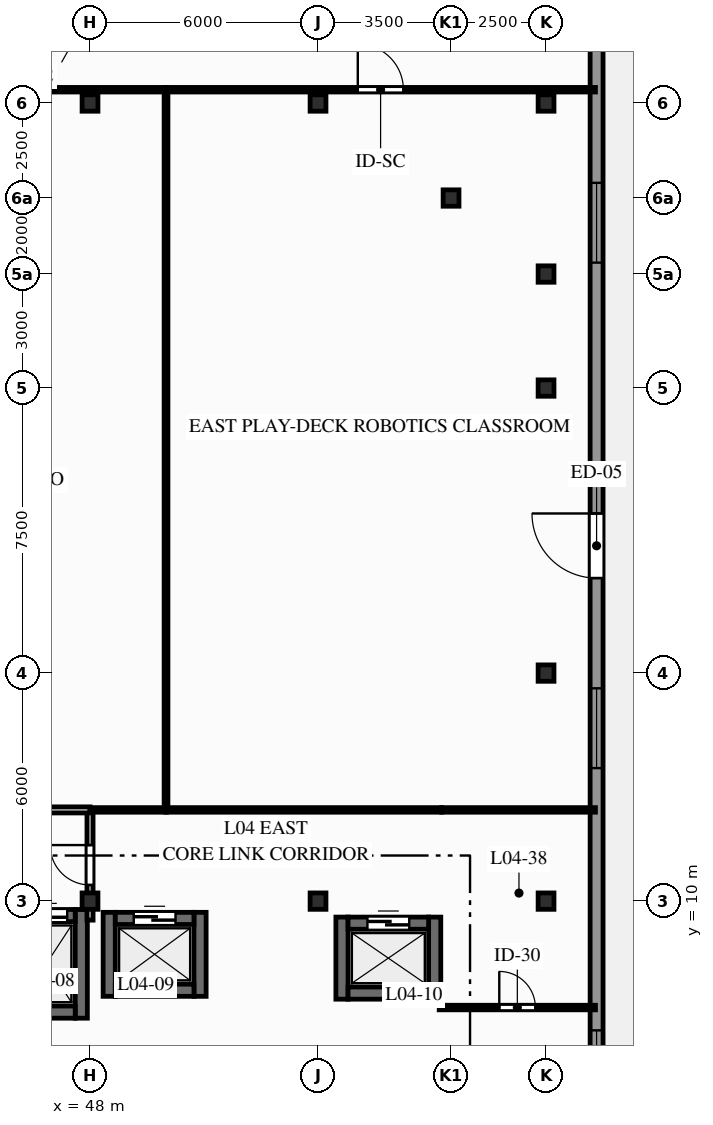
"""IFC4 building model, lengths in metres.
Left out: names, types, materials, properties, quantities, classifications, styles, units other than length and angle.
Written with IfcOpenShell. Run it as: python <this file> out.ifc"""

import sys

from ifc_helpers import new_model, si_unit, direction, frame, frame_2d, origin, origin_2d, place, context, subcontext, project, spatial, rectangle, i_section, extrude, element, fill, save


model = new_model("IFC4")
c1 = context("Model", 3, precision=1e-05, world=origin(), true_north=direction((0.0, 1.0)))
c2 = subcontext(c1, "Body", "Model", "MODEL_VIEW")
j1 = project(units=[si_unit("LENGTHUNIT", "METRE"), si_unit("PLANEANGLEUNIT", "RADIAN")], contexts=[c1])
p1 = place(None, origin())
s1 = spatial("IfcSite", under=j1, at=p1, CompositionType="ELEMENT")
p2 = place(p1, origin())
s2 = spatial("IfcBuilding", under=s1, at=p2, CompositionType="ELEMENT")
p3 = place(p2, frame((0.0, 0.0, 18.0)))
s3 = spatial("IfcBuildingStorey", under=s2, at=p3, CompositionType="ELEMENT", Elevation=18.0)
for number, where, z_axis, x_axis in (
    (1, (48.0, 10.0, 0.0), (0.0, 0.0, 1.0), (1.0, 0.0, 0.0)),
    (2, (48.0, 31.0, 0.0), (0.0, 0.0, 1.0), (1.0, 0.0, 0.0)),
    (3, (54.0, 10.0, 0.0), (0.0, 0.0, 1.0), (1.0, 0.0, 0.0)),
    (4, (54.0, 31.0, 0.0), (0.0, 0.0, 1.0), (1.0, 0.0, 0.0)),
    (5, (57.5, 28.5, 0.0), (0.0, 0.0, 1.0), (1.0, 0.0, 0.0)),
    (6, (60.0, 10.0, 0.0), (0.0, 0.0, 1.0), (1.0, 0.0, 0.0)),
    (7, (60.0, 16.0, 0.0), (0.0, 0.0, 1.0), (1.0, 0.0, 0.0)),
    (8, (60.0, 23.5, 0.0), (0.0, 0.0, 1.0), (1.0, 0.0, 0.0)),
    (9, (60.0, 26.5, 0.0), (0.0, 0.0, 1.0), (1.0, 0.0, 0.0)),
    (10, (60.0, 31.0, 0.0), (0.0, 0.0, 1.0), (1.0, 0.0, 0.0)),
):
    element("IfcColumn", number, at=place(p3, frame(where, z_axis=z_axis, x_axis=x_axis)), inside=s3, PredefinedType="COLUMN", context=c2, shape_type="SweptSolid", body=[
        extrude(i_section(OverallWidth=0.417, OverallDepth=0.431, WebThickness=0.065, FlangeThickness=0.106, FilletRadius=0.015, at=origin_2d()), origin(), (0.0, 0.0, 1.0), 4.5),
    ])
p4 = place(p3, frame((61.33, -1.83, 0.0), z_axis=(0.0, 0.0, 1.0), x_axis=(0.0, 1.0, 0.0)))
e11 = element("IfcWall", 11, at=p4, inside=s3, PredefinedType="STANDARD", context=c2, shape_type="SweptSolid", body=[
    extrude(rectangle(XDim=36.43, YDim=0.34, at=frame_2d((18.215, 0.0))), origin(), (0.0, 0.0, 1.0), 4.22),
])
p5 = place(p4, frame((6.33, 0.0, 0.9)))
e12 = element("IfcOpeningElement", 12, at=p5, cuts=e11, PredefinedType="OPENING", context=c2, shape_type="SweptSolid", body=[
    extrude(rectangle(XDim=2.1, YDim=2.05, at=frame_2d((1.05, 1.025))), frame((0.0, 0.18, 0.0), z_axis=(0.0, -1.0, 0.0), x_axis=(1.0, 0.0, 0.0)), (0.0, 0.0, 1.0), 0.36),
])
p6 = place(p4, frame((15.33, 0.0, 0.9)))
e13 = element("IfcOpeningElement", 13, at=p6, cuts=e11, PredefinedType="OPENING", context=c2, shape_type="SweptSolid", body=[
    extrude(rectangle(XDim=2.1, YDim=2.05, at=frame_2d((1.05, 1.025))), frame((0.0, 0.18, 0.0), z_axis=(0.0, -1.0, 0.0), x_axis=(1.0, 0.0, 0.0)), (0.0, 0.0, 1.0), 0.36),
])
p7 = place(p4, frame((28.63, 0.0, 0.9)))
e14 = element("IfcOpeningElement", 14, at=p7, cuts=e11, PredefinedType="OPENING", context=c2, shape_type="SweptSolid", body=[
    extrude(rectangle(XDim=2.1, YDim=2.05, at=frame_2d((1.05, 1.025))), frame((0.0, 0.18, 0.0), z_axis=(0.0, -1.0, 0.0), x_axis=(1.0, 0.0, 0.0)), (0.0, 0.0, 1.0), 0.36),
])
p8 = place(p4, frame((20.33, 0.0, 0.0)))
e15 = element("IfcOpeningElement", 15, at=p8, cuts=e11, PredefinedType="OPENING", context=c2, shape_type="SweptSolid", body=[
    extrude(rectangle(XDim=1.7, YDim=2.3, at=frame_2d((0.85, 1.15))), frame((0.0, 0.18, 0.0), z_axis=(0.0, -1.0, 0.0), x_axis=(1.0, 0.0, 0.0)), (0.0, 0.0, 1.0), 0.36),
])
p9 = place(p3, frame((47.77, 6.92, 0.0), z_axis=(0.0, 0.0, 1.0), x_axis=(0.0, 1.0, 0.0)))
e16 = element("IfcWall", 16, at=p9, inside=s3, PredefinedType="SHEAR", context=c2, shape_type="SweptSolid", body=[
    extrude(rectangle(XDim=2.86, YDim=0.32, at=frame_2d((1.43, 0.0))), origin(), (0.0, 0.0, 1.0), 4.22),
])
p10 = place(p3, frame((46.09, 7.08, 0.0), z_axis=(0.0, 0.0, 1.0), x_axis=(1.0, 0.0, 0.0)))
e17 = element("IfcWall", 17, at=p10, inside=s3, PredefinedType="SHEAR", context=c2, shape_type="SweptSolid", body=[
    extrude(rectangle(XDim=1.52, YDim=0.32, at=frame_2d((0.76, 0.0))), origin(), (0.0, 0.0, 1.0), 4.22),
])
p11 = place(p3, frame((46.09, 9.62, 0.0), z_axis=(0.0, 0.0, 1.0), x_axis=(1.0, 0.0, 0.0)))
e18 = element("IfcWall", 18, at=p11, inside=s3, PredefinedType="SHEAR", context=c2, shape_type="SweptSolid", body=[
    extrude(rectangle(XDim=1.52, YDim=0.32, at=frame_2d((0.76, 0.0))), origin(), (0.0, 0.0, 1.0), 4.22),
])
p12 = place(p11, frame((0.21, 0.0, 0.0)))
e19 = element("IfcOpeningElement", 19, at=p12, cuts=e18, PredefinedType="OPENING", context=c2, shape_type="SweptSolid", body=[
    extrude(rectangle(XDim=1.1, YDim=2.06, at=frame_2d((0.55, 1.03))), frame((0.0, 0.17, 0.0), z_axis=(0.0, -1.0, 0.0), x_axis=(1.0, 0.0, 0.0)), (0.0, 0.0, 1.0), 0.34),
])
for number, where, z_axis, x_axis in (
    (20, (48.505, 7.495, 0.0), (0.0, 0.0, 1.0), (0.0, 1.0, 0.0)),
    (21, (50.895, 7.495, 0.0), (0.0, 0.0, 1.0), (0.0, 1.0, 0.0)),
):
    element("IfcWall", number, at=place(p3, frame(where, z_axis=z_axis, x_axis=x_axis)), inside=s3, PredefinedType="SHEAR", context=c2, shape_type="SweptSolid", body=[
        extrude(rectangle(XDim=2.21, YDim=0.32, at=frame_2d((1.105, 0.0))), origin(), (0.0, 0.0, 1.0), 4.22),
    ])
p13 = place(p3, frame((48.665, 7.655, 0.0), z_axis=(0.0, 0.0, 1.0), x_axis=(1.0, 0.0, 0.0)))
e22 = element("IfcWall", 22, at=p13, inside=s3, PredefinedType="SHEAR", context=c2, shape_type="SweptSolid", body=[
    extrude(rectangle(XDim=2.07, YDim=0.32, at=frame_2d((1.035, 0.0))), origin(), (0.0, 0.0, 1.0), 4.22),
])
p14 = place(p3, frame((48.665, 9.545, 0.0), z_axis=(0.0, 0.0, 1.0), x_axis=(1.0, 0.0, 0.0)))
e23 = element("IfcWall", 23, at=p14, inside=s3, PredefinedType="SHEAR", context=c2, shape_type="SweptSolid", body=[
    extrude(rectangle(XDim=2.07, YDim=0.32, at=frame_2d((1.035, 0.0))), origin(), (0.0, 0.0, 1.0), 4.22),
])
p15 = place(p14, frame((0.485, 0.0, 0.0)))
e24 = element("IfcOpeningElement", 24, at=p15, cuts=e23, PredefinedType="OPENING", context=c2, shape_type="SweptSolid", body=[
    extrude(rectangle(XDim=1.1, YDim=2.06, at=frame_2d((0.55, 1.03))), frame((0.0, 0.17, 0.0), z_axis=(0.0, -1.0, 0.0), x_axis=(1.0, 0.0, 0.0)), (0.0, 0.0, 1.0), 0.34),
])
for number, where, z_axis, x_axis in (
    (25, (54.63, 7.42, 0.0), (0.0, 0.0, 1.0), (0.0, 1.0, 0.0)),
    (26, (57.07, 7.42, 0.0), (0.0, 0.0, 1.0), (0.0, 1.0, 0.0)),
):
    element("IfcWall", number, at=place(p3, frame(where, z_axis=z_axis, x_axis=x_axis)), inside=s3, PredefinedType="SHEAR", context=c2, shape_type="SweptSolid", body=[
        extrude(rectangle(XDim=2.16, YDim=0.32, at=frame_2d((1.08, 0.0))), origin(), (0.0, 0.0, 1.0), 4.22),
    ])
p16 = place(p3, frame((54.79, 7.58, 0.0), z_axis=(0.0, 0.0, 1.0), x_axis=(1.0, 0.0, 0.0)))
e27 = element("IfcWall", 27, at=p16, inside=s3, PredefinedType="SHEAR", context=c2, shape_type="SweptSolid", body=[
    extrude(rectangle(XDim=2.12, YDim=0.32, at=frame_2d((1.06, 0.0))), origin(), (0.0, 0.0, 1.0), 4.22),
])
p17 = place(p3, frame((54.79, 9.42, 0.0), z_axis=(0.0, 0.0, 1.0), x_axis=(1.0, 0.0, 0.0)))
e28 = element("IfcWall", 28, at=p17, inside=s3, PredefinedType="SHEAR", context=c2, shape_type="SweptSolid", body=[
    extrude(rectangle(XDim=2.12, YDim=0.32, at=frame_2d((1.06, 0.0))), origin(), (0.0, 0.0, 1.0), 4.22),
])
p18 = place(p17, frame((0.51, 0.0, 0.0)))
e29 = element("IfcOpeningElement", 29, at=p18, cuts=e28, PredefinedType="OPENING", context=c2, shape_type="SweptSolid", body=[
    extrude(rectangle(XDim=1.1, YDim=2.06, at=frame_2d((0.55, 1.03))), frame((0.0, 0.17, 0.0), z_axis=(0.0, -1.0, 0.0), x_axis=(1.0, 0.0, 0.0)), (0.0, 0.0, 1.0), 0.34),
])
p19 = place(p3, frame((48.0, 9.5, 0.0), z_axis=(0.0, 0.0, 1.0), x_axis=(0.0, 1.0, 0.0)))
e30 = element("IfcWall", 30, at=p19, inside=s3, PredefinedType="PARTITIONING", context=c2, shape_type="SweptSolid", body=[
    extrude(rectangle(XDim=2.9, YDim=0.16, at=frame_2d((1.45, 0.0))), origin(), (0.0, 0.0, 1.0), 3.344),
])
p20 = place(p19, frame((0.925, 0.0, 0.0)))
e31 = element("IfcOpeningElement", 31, at=p20, cuts=e30, PredefinedType="OPENING", context=c2, shape_type="SweptSolid", body=[
    extrude(rectangle(XDim=1.05, YDim=2.06, at=frame_2d((0.525, 1.03))), frame((0.0, 0.09, 0.0), z_axis=(0.0, -1.0, 0.0), x_axis=(1.0, 0.0, 0.0)), (0.0, 0.0, 1.0), 0.18),
])
p21 = place(p3, frame((42.2, 12.4, 0.0), z_axis=(0.0, 0.0, 1.0), x_axis=(1.0, 0.0, 0.0)))
e32 = element("IfcWall", 32, at=p21, inside=s3, PredefinedType="PARTITIONING", context=c2, shape_type="SweptSolid", body=[
    extrude(rectangle(XDim=5.8, YDim=0.16, at=frame_2d((2.9, 0.0))), origin(), (0.0, 0.0, 1.0), 3.344),
])
p22 = place(p3, frame((38.493, 31.35, 0.0), z_axis=(0.0, 0.0, 1.0), x_axis=(1.0, 0.0, 0.0)))
e33 = element("IfcWall", 33, at=p22, inside=s3, PredefinedType="PARTITIONING", context=c2, shape_type="SweptSolid", body=[
    extrude(rectangle(XDim=11.519, YDim=0.12, at=frame_2d((5.759, 0.0))), origin(), (0.0, 0.0, 1.0), 3.344),
])
p23 = place(p22, frame((5.159, 0.0, 0.0)))
e34 = element("IfcOpeningElement", 34, at=p23, cuts=e33, PredefinedType="OPENING", context=c2, shape_type="SweptSolid", body=[
    extrude(rectangle(XDim=1.2, YDim=2.08, at=frame_2d((0.6, 1.04))), frame((0.0, 0.07, 0.0), z_axis=(0.0, -1.0, 0.0), x_axis=(1.0, 0.0, 0.0)), (0.0, 0.0, 1.0), 0.14),
])
p24 = place(p3, frame((49.993, 31.35, 0.0), z_axis=(0.0, 0.0, 1.0), x_axis=(1.0, 0.0, 0.0)))
e35 = element("IfcWall", 35, at=p24, inside=s3, PredefinedType="PARTITIONING", context=c2, shape_type="SweptSolid", body=[
    extrude(rectangle(XDim=11.307, YDim=0.12, at=frame_2d((5.654, 0.0))), origin(), (0.0, 0.0, 1.0), 4.22),
])
p25 = place(p24, frame((5.054, 0.0, 0.0)))
e36 = element("IfcOpeningElement", 36, at=p25, cuts=e35, PredefinedType="OPENING", context=c2, shape_type="SweptSolid", body=[
    extrude(rectangle(XDim=1.2, YDim=2.08, at=frame_2d((0.6, 1.04))), frame((0.0, 0.07, 0.0), z_axis=(0.0, -1.0, 0.0), x_axis=(1.0, 0.0, 0.0)), (0.0, 0.0, 1.0), 0.14),
])
p26 = place(p3, frame((48.004, 12.4, 0.0), z_axis=(0.0, 0.0, 1.0), x_axis=(1.0, 0.0, 0.0)))
e37 = element("IfcWall", 37, at=p26, inside=s3, PredefinedType="PARTITIONING", context=c2, shape_type="SweptSolid", body=[
    extrude(rectangle(XDim=2.007, YDim=0.12, at=frame_2d((1.004, 0.0))), origin(), (0.0, 0.0, 1.0), 3.344),
])
p27 = place(p3, frame((49.993, 12.4, 0.0), z_axis=(0.0, 0.0, 1.0), x_axis=(1.0, 0.0, 0.0)))
e38 = element("IfcWall", 38, at=p27, inside=s3, PredefinedType="PARTITIONING", context=c2, shape_type="SweptSolid", body=[
    extrude(rectangle(XDim=7.257, YDim=0.12, at=frame_2d((3.629, 0.0))), origin(), (0.0, 0.0, 1.0), 3.344),
])
p28 = place(p3, frame((50.0, 12.404, 0.0), z_axis=(0.0, 0.0, 1.0), x_axis=(0.0, 1.0, 0.0)))
e39 = element("IfcWall", 39, at=p28, inside=s3, PredefinedType="PARTITIONING", context=c2, shape_type="SweptSolid", body=[
    extrude(rectangle(XDim=18.942, YDim=0.1, at=frame_2d((9.471, 0.0))), origin(), (0.0, 0.0, 1.0), 3.583),
])
p29 = place(p3, frame((57.254, 12.4, 0.0), z_axis=(0.0, 0.0, 1.0), x_axis=(1.0, 0.0, 0.0)))
e40 = element("IfcWall", 40, at=p29, inside=s3, PredefinedType="PARTITIONING", context=c2, shape_type="SweptSolid", body=[
    extrude(rectangle(XDim=4.046, YDim=0.12, at=frame_2d((2.023, 0.0))), origin(), (0.0, 0.0, 1.0), 3.583),
])
p30 = place(p3, frame((57.189, 7.2, 0.0), z_axis=(0.0, 0.0, 1.0), x_axis=(1.0, 0.0, 0.0)))
e41 = element("IfcWall", 41, at=p30, inside=s3, PredefinedType="PARTITIONING", context=c2, shape_type="SweptSolid", body=[
    extrude(rectangle(XDim=4.111, YDim=0.12, at=frame_2d((2.056, 0.0))), origin(), (0.0, 0.0, 1.0), 4.22),
])
p31 = place(p30, frame((1.581, 0.0, 0.0)))
e42 = element("IfcOpeningElement", 42, at=p31, cuts=e41, PredefinedType="OPENING", context=c2, shape_type="SweptSolid", body=[
    extrude(rectangle(XDim=0.95, YDim=2.05, at=frame_2d((0.475, 1.025))), frame((0.0, 0.07, 0.0), z_axis=(0.0, -1.0, 0.0), x_axis=(1.0, 0.0, 0.0)), (0.0, 0.0, 1.0), 0.14),
])
p32 = place(p5, origin())
e43 = element("IfcWindow", 43, at=p32, inside=s3, PartitioningType="SINGLE_PANEL", PredefinedType="WINDOW", context=c2, shape_type="SweptSolid", body=[
    extrude(rectangle(XDim=2.1, YDim=2.05, at=frame_2d((1.05, 1.025))), frame((0.0, 0.03, 0.0), z_axis=(0.0, -1.0, 0.0), x_axis=(1.0, 0.0, 0.0)), (0.0, 0.0, 1.0), 0.06),
])
fill(e12, e43)
p33 = place(p6, origin())
e44 = element("IfcWindow", 44, at=p33, inside=s3, PartitioningType="SINGLE_PANEL", PredefinedType="WINDOW", context=c2, shape_type="SweptSolid", body=[
    extrude(rectangle(XDim=2.1, YDim=2.05, at=frame_2d((1.05, 1.025))), frame((0.0, 0.03, 0.0), z_axis=(0.0, -1.0, 0.0), x_axis=(1.0, 0.0, 0.0)), (0.0, 0.0, 1.0), 0.06),
])
fill(e13, e44)
p34 = place(p7, origin())
e45 = element("IfcWindow", 45, at=p34, inside=s3, PartitioningType="SINGLE_PANEL", PredefinedType="WINDOW", context=c2, shape_type="SweptSolid", body=[
    extrude(rectangle(XDim=2.1, YDim=2.05, at=frame_2d((1.05, 1.025))), frame((0.0, 0.03, 0.0), z_axis=(0.0, -1.0, 0.0), x_axis=(1.0, 0.0, 0.0)), (0.0, 0.0, 1.0), 0.06),
])
fill(e14, e45)
p35 = place(p8, origin())
e46 = element("IfcDoor", 46, at=p35, inside=s3, OperationType="SINGLE_SWING_RIGHT", PredefinedType="DOOR", context=c2, shape_type="SweptSolid", body=[
    extrude(rectangle(XDim=1.7, YDim=2.3, at=frame_2d((0.85, 1.15))), frame((0.0, 0.025, 0.0), z_axis=(0.0, -1.0, 0.0), x_axis=(1.0, 0.0, 0.0)), (0.0, 0.0, 1.0), 0.05),
])
fill(e15, e46)
p36 = place(p12, origin())
e47 = element("IfcDoor", 47, at=p36, inside=s3, OperationType="SLIDING_TO_LEFT", PredefinedType="DOOR", context=c2, shape_type="SweptSolid", body=[
    extrude(rectangle(XDim=1.1, YDim=2.06, at=frame_2d((0.55, 1.03))), frame((0.0, 0.025, 0.0), z_axis=(0.0, -1.0, 0.0), x_axis=(1.0, 0.0, 0.0)), (0.0, 0.0, 1.0), 0.05),
])
fill(e19, e47)
p37 = place(p15, origin())
e48 = element("IfcDoor", 48, at=p37, inside=s3, OperationType="SLIDING_TO_RIGHT", PredefinedType="DOOR", context=c2, shape_type="SweptSolid", body=[
    extrude(rectangle(XDim=1.1, YDim=2.06, at=frame_2d((0.55, 1.03))), frame((0.0, 0.025, 0.0), z_axis=(0.0, -1.0, 0.0), x_axis=(1.0, 0.0, 0.0)), (0.0, 0.0, 1.0), 0.05),
])
fill(e24, e48)
p38 = place(p18, origin())
e49 = element("IfcDoor", 49, at=p38, inside=s3, OperationType="SLIDING_TO_LEFT", PredefinedType="DOOR", context=c2, shape_type="SweptSolid", body=[
    extrude(rectangle(XDim=1.1, YDim=2.06, at=frame_2d((0.55, 1.03))), frame((0.0, 0.025, 0.0), z_axis=(0.0, -1.0, 0.0), x_axis=(1.0, 0.0, 0.0)), (0.0, 0.0, 1.0), 0.05),
])
fill(e29, e49)
p39 = place(p20, origin())
e50 = element("IfcDoor", 50, at=p39, inside=s3, OperationType="SINGLE_SWING_RIGHT", PredefinedType="DOOR", context=c2, shape_type="SweptSolid", body=[
    extrude(rectangle(XDim=1.05, YDim=2.06, at=frame_2d((0.525, 1.03))), frame((0.0, 0.025, 0.0), z_axis=(0.0, -1.0, 0.0), x_axis=(1.0, 0.0, 0.0)), (0.0, 0.0, 1.0), 0.05),
])
fill(e31, e50)
p40 = place(p25, origin())
e51 = element("IfcDoor", 51, at=p40, inside=s3, OperationType="SINGLE_SWING_LEFT", PredefinedType="DOOR", context=c2, shape_type="SweptSolid", body=[
    extrude(rectangle(XDim=1.2, YDim=2.08, at=frame_2d((0.6, 1.04))), frame((0.0, 0.025, 0.0), z_axis=(0.0, -1.0, 0.0), x_axis=(1.0, 0.0, 0.0)), (0.0, 0.0, 1.0), 0.05),
])
fill(e36, e51)
p41 = place(p31, origin())
e52 = element("IfcDoor", 52, at=p41, inside=s3, OperationType="SINGLE_SWING_LEFT", PredefinedType="DOOR", context=c2, shape_type="SweptSolid", body=[
    extrude(rectangle(XDim=0.95, YDim=2.05, at=frame_2d((0.475, 1.025))), frame((0.0, 0.025, 0.0), z_axis=(0.0, -1.0, 0.0), x_axis=(1.0, 0.0, 0.0)), (0.0, 0.0, 1.0), 0.05),
])
fill(e42, e52)
save(model, sys.argv[1])
